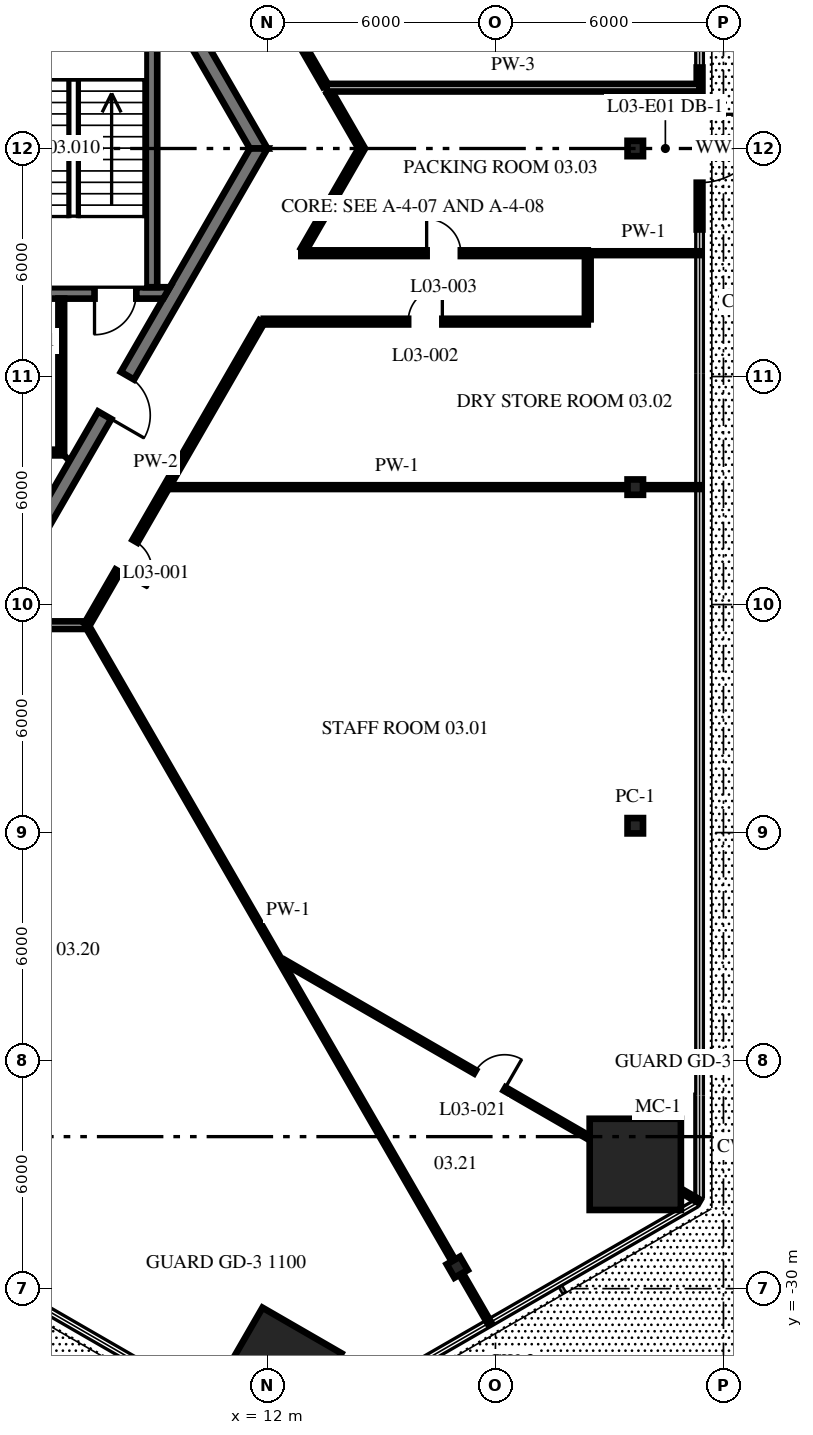
"""IFC4 building model, lengths in metres.
Left out: names, types, materials, properties, quantities, classifications, styles, units other than length and angle.
Written with IfcOpenShell. Run it as: python <this file> out.ifc"""

import sys

from ifc_helpers import new_model, si_unit, direction, frame, frame_2d, origin, origin_2d, place, context, subcontext, project, spatial, polyline, rectangle, i_section, outline, extrude, source, transform, mapped, element, fill, save


model = new_model("IFC4")
c1 = context("Model", 3, precision=1e-05, world=origin(), true_north=direction((0.0, 1.0)))
c2 = subcontext(c1, "Body", "Model", "MODEL_VIEW")
j1 = project(units=[si_unit("LENGTHUNIT", "METRE"), si_unit("PLANEANGLEUNIT", "RADIAN")], contexts=[c1])
p1 = place(None, origin())
s1 = spatial("IfcSite", under=j1, at=p1, CompositionType="ELEMENT")
p2 = place(p1, origin())
s2 = spatial("IfcBuilding", under=s1, at=p2, CompositionType="ELEMENT")
p3 = place(p2, frame((0.0, 0.0, 16.0)))
s3 = spatial("IfcBuildingStorey", under=s2, at=p3, CompositionType="ELEMENT", Elevation=16.0)
m1 = source(origin(), c2, "Body", "SweptSolid", [
    extrude(rectangle(XDim=2.4, YDim=2.4, at=origin_2d()), origin(), (0.0, 0.0, 1.0), 4.3),
])
p4 = place(p3, frame((21.679, -26.73, 0.0), z_axis=(0.0, 0.0, 1.0), x_axis=(0.0, 1.0, 0.0)))
e1 = element("IfcColumn", 1, at=p4, inside=s3, PredefinedType="COLUMN", context=c2, shape_type="MappedRepresentation", body=[
    mapped(m1, transform((0.0, 0.0, 0.0), scale=1.0)),
])
m2 = source(origin(), c2, "Body", "SweptSolid", [
    extrude(i_section(OverallWidth=0.404, OverallDepth=0.406, WebThickness=0.027, FlangeThickness=0.044, at=origin_2d()), origin(), (0.0, 0.0, 1.0), 4.3),
])
for number, where, z_axis, x_axis in (
    (2, (21.679, -17.82, 0.0), (0.0, 0.0, 1.0), (0.0, 1.0, 0.0)),
    (3, (21.679, -8.91, 0.0), (0.0, 0.0, 1.0), (0.0, 1.0, 0.0)),
    (4, (21.679, 0.0, 0.0), (0.0, 0.0, 1.0), (0.0, 1.0, 0.0)),
):
    element("IfcColumn", number, at=place(p3, frame(where, z_axis=z_axis, x_axis=x_axis)), inside=s3, PredefinedType="COLUMN", context=c2, shape_type="MappedRepresentation", body=[
        mapped(m2, transform((0.0, 0.0, 0.0), scale=1.0)),
    ])
p5 = place(p3, frame((12.309, -32.14, 0.0), z_axis=(0.0, 0.0, 1.0), x_axis=(0.866025403784, -0.5, 0.0)))
e5 = element("IfcColumn", 5, at=p5, inside=s3, PredefinedType="COLUMN", context=c2, shape_type="MappedRepresentation", body=[
    mapped(m1, transform((0.0, 0.0, 0.0), scale=1.0)),
])
p6 = place(p3, frame((16.994, -29.435, 0.0), z_axis=(0.0, 0.0, 1.0), x_axis=(0.866026276448, 0.4999984885, 0.0)))
e6 = element("IfcColumn", 6, at=p6, inside=s3, PredefinedType="COLUMN", context=c2, shape_type="MappedRepresentation", body=[
    mapped(m2, transform((0.0, 0.0, 0.0), scale=1.0)),
])
m3 = source(origin(), c2, "Body", "SweptSolid", [
    extrude(outline(polyline([(-0.115, -0.2), (11.885, -0.2), (11.654, 0.2), (0.115, 0.2), (-0.115, -0.2)])), origin(), (0.0, 0.0, 1.0), 4.1),
])
p7 = place(p3, frame((11.769, 0.0, 0.0), z_axis=(0.0, 0.0, 1.0), x_axis=(-0.499996592174, 0.866027371285, 0.0)))
e7 = element("IfcWall", 7, at=p7, inside=s3, PredefinedType="SHEAR", context=c2, shape_type="MappedRepresentation", body=[
    mapped(m3, transform((0.0, 0.0, 0.0), scale=1.0)),
])
p8 = place(p7, frame((5.75, 0.0, 0.0)))
e8 = element("IfcOpeningElement", 8, at=p8, cuts=e7, PredefinedType="OPENING", context=c2, shape_type="SweptSolid", body=[
    extrude(rectangle(XDim=1.2, YDim=2.1, at=frame_2d((0.6, 1.05))), frame((0.0, 0.21, 0.0), z_axis=(0.0, -1.0, 0.0), x_axis=(1.0, 0.0, 0.0)), (0.0, 0.0, 1.0), 0.42),
])
p9 = place(p3, frame((5.885, -10.192, 0.0), z_axis=(0.0, 0.0, 1.0), x_axis=(0.499996592174, 0.866027371285, 0.0)))
e9 = element("IfcWall", 9, at=p9, inside=s3, PredefinedType="SHEAR", context=c2, shape_type="MappedRepresentation", body=[
    mapped(m3, transform((0.0, 0.0, 0.0), scale=1.0)),
])
p10 = place(p9, frame((3.665, 0.0, 0.0)))
e10 = element("IfcOpeningElement", 10, at=p10, cuts=e9, PredefinedType="OPENING", context=c2, shape_type="SweptSolid", body=[
    extrude(rectangle(XDim=1.2, YDim=2.1, at=frame_2d((0.6, 1.05))), frame((0.0, 0.21, 0.0), z_axis=(0.0, -1.0, 0.0), x_axis=(1.0, 0.0, 0.0)), (0.0, 0.0, 1.0), 0.42),
])
m4 = source(origin(), c2, "Body", "SweptSolid", [
    extrude(outline(polyline([(0.0, -0.15), (0.0, 0.15), (4.433, 0.15), (4.26, -0.15), (0.0, -0.15)])), origin(), (0.0, 0.0, 1.0), 4.1),
])
p11 = place(p3, frame((5.0, -3.8, 0.0), z_axis=(0.0, 0.0, 1.0), x_axis=(1.0, 0.0, 0.0)))
e11 = element("IfcWall", 11, at=p11, inside=s3, PredefinedType="SHEAR", context=c2, shape_type="MappedRepresentation", body=[
    mapped(m4, transform((0.0, 0.0, 0.0), scale=1.0)),
])
p12 = place(p11, frame((2.45, 0.0, 0.0)))
e12 = element("IfcOpeningElement", 12, at=p12, cuts=e11, PredefinedType="OPENING", context=c2, shape_type="SweptSolid", body=[
    extrude(rectangle(XDim=1.1, YDim=2.1, at=frame_2d((0.55, 1.05))), frame((0.0, 0.16, 0.0), z_axis=(0.0, -1.0, 0.0), x_axis=(1.0, 0.0, 0.0)), (0.0, 0.0, 1.0), 0.32),
])
m5 = source(origin(), c2, "Body", "SweptSolid", [
    extrude(rectangle(XDim=7.3, YDim=0.3, at=frame_2d((3.65, 0.0))), origin(), (0.0, 0.0, 1.0), 4.1),
])
p13 = place(p3, frame((8.95, -3.65, 0.0), z_axis=(0.0, 0.0, 1.0), x_axis=(0.0, 1.0, 0.0)))
e13 = element("IfcWall", 13, at=p13, inside=s3, PredefinedType="SHEAR", context=c2, shape_type="MappedRepresentation", body=[
    mapped(m5, transform((0.0, 0.0, 0.0), scale=1.0)),
])
m6 = source(origin(), c2, "Body", "SweptSolid", [
    extrude(outline(polyline([(0.0, -0.075), (1.65, -0.075), (1.5, 0.075), (0.0, 0.075), (0.0, -0.075)])), origin(), (0.0, 0.0, 1.0), 4.1),
])
p14 = place(p3, frame((5.0, -8.0, 0.0), z_axis=(0.0, 0.0, 1.0), x_axis=(1.0, 0.0, 0.0)))
e14 = element("IfcWall", 14, at=p14, inside=s3, PredefinedType="PARTITIONING", context=c2, shape_type="MappedRepresentation", body=[
    mapped(m6, transform((0.0, 0.0, 0.0), scale=1.0)),
])
p15 = place(p14, frame((0.337, 0.0, 0.0)))
e15 = element("IfcOpeningElement", 15, at=p15, cuts=e14, PredefinedType="OPENING", context=c2, shape_type="SweptSolid", body=[
    extrude(rectangle(XDim=0.9, YDim=2.1, at=frame_2d((0.45, 1.05))), frame((0.0, 0.085, 0.0), z_axis=(0.0, -1.0, 0.0), x_axis=(1.0, 0.0, 0.0)), (0.0, 0.0, 1.0), 0.17),
])
p16 = place(p3, frame((6.575, -8.0, 0.0), z_axis=(0.0, 0.0, 1.0), x_axis=(0.0, 1.0, 0.0)))
e16 = element("IfcWall", 16, at=p16, inside=s3, PredefinedType="PARTITIONING", context=c2, shape_type="SweptSolid", body=[
    extrude(outline(polyline([(-0.075, -0.075), (4.05, -0.075), (4.05, 0.075), (0.075, 0.075), (-0.075, -0.075)])), origin(), (0.0, 0.0, 1.0), 4.1),
])
m7 = source(origin(), c2, "Body", "SweptSolid", [
    extrude(rectangle(XDim=4.263, YDim=0.15, at=frame_2d((2.131, 0.0))), origin(), (0.0, 0.0, 1.0), 4.1),
])
p17 = place(p3, frame((23.371, 2.131, 0.0), z_axis=(0.0, 0.0, 1.0), x_axis=(0.0, -1.0, 0.0)))
e17 = element("IfcWall", 17, at=p17, inside=s3, PredefinedType="ELEMENTEDWALL", context=c2, shape_type="MappedRepresentation", body=[
    mapped(m7, transform((0.0, 0.0, 0.0), scale=1.0)),
])
p18 = place(p17, frame((1.231, 0.0, 0.0)))
e18 = element("IfcOpeningElement", 18, at=p18, cuts=e17, PredefinedType="OPENING", context=c2, shape_type="SweptSolid", body=[
    extrude(rectangle(XDim=1.8, YDim=2.4, at=frame_2d((0.9, 1.2))), frame((0.0, 0.085, 0.0), z_axis=(0.0, -1.0, 0.0), x_axis=(1.0, 0.0, 0.0)), (0.0, 0.0, 1.0), 0.17),
])
p19 = place(p3, frame((7.241, -12.542, 0.0), z_axis=(0.0, 0.0, 1.0), x_axis=(0.500004409704, -0.866022857826, 0.0)))
e19 = element("IfcWall", 19, at=p19, inside=s3, PredefinedType="PARTITIONING", context=c2, shape_type="SweptSolid", body=[
    extrude(rectangle(XDim=19.313, YDim=0.1, at=frame_2d((9.656, 0.0))), origin(), (0.0, 0.0, 1.0), 4.1),
])
m8 = source(origin(), c2, "Body", "SweptSolid", [
    extrude(rectangle(XDim=1.499, YDim=0.1, at=frame_2d((0.749, 0.0))), origin(), (0.0, 0.0, 1.0), 4.1),
])
p20 = place(p3, frame((17.091, -29.602, 0.0), z_axis=(0.0, 0.0, 1.0), x_axis=(0.499976292358, -0.866039090965, 0.0)))
e20 = element("IfcWall", 20, at=p20, inside=s3, PredefinedType="PARTITIONING", context=c2, shape_type="MappedRepresentation", body=[
    mapped(m8, transform((0.0, 0.0, 0.0), scale=1.0)),
])
p21 = place(p3, frame((10.83, 6.327, 0.0), z_axis=(0.0, 0.0, 1.0), x_axis=(0.500005980693, -0.866021950802, 0.0)))
e21 = element("IfcWall", 21, at=p21, inside=s3, PredefinedType="PARTITIONING", context=c2, shape_type="SweptSolid", body=[
    extrude(rectangle(XDim=5.392, YDim=0.15, at=frame_2d((2.696, 0.0))), origin(), (0.0, 0.0, 1.0), 4.1),
])
p22 = place(p3, frame((13.625, 1.484, 0.0), z_axis=(0.0, 0.0, 1.0), x_axis=(0.500075917473, -0.865981568374, 0.0)))
e22 = element("IfcWall", 22, at=p22, inside=s3, PredefinedType="PARTITIONING", context=c2, shape_type="SweptSolid", body=[
    extrude(rectangle(XDim=1.674, YDim=0.15, at=frame_2d((0.837, 0.0))), origin(), (0.0, 0.0, 1.0), 4.1),
])
p23 = place(p3, frame((12.43, -21.39, 0.0), z_axis=(0.0, 0.0, 1.0), x_axis=(0.866017819526, -0.500013136091, 0.0)))
e23 = element("IfcWall", 23, at=p23, inside=s3, PredefinedType="PARTITIONING", context=c2, shape_type="SweptSolid", body=[
    extrude(rectangle(XDim=9.306, YDim=0.1, at=frame_2d((4.653, 0.0))), origin(), (0.0, 0.0, 1.0), 4.1),
])
p24 = place(p23, frame((5.81, 0.0, 0.0)))
e24 = element("IfcOpeningElement", 24, at=p24, cuts=e23, PredefinedType="OPENING", context=c2, shape_type="SweptSolid", body=[
    extrude(rectangle(XDim=0.9, YDim=2.1, at=frame_2d((0.45, 1.05))), frame((0.0, 0.06, 0.0), z_axis=(0.0, -1.0, 0.0), x_axis=(1.0, 0.0, 0.0)), (0.0, 0.0, 1.0), 0.12),
])
p25 = place(p3, frame((22.869, -27.417, 0.0), z_axis=(0.0, 0.0, 1.0), x_axis=(0.866031268329, -0.499989842173, 0.0)))
e25 = element("IfcWall", 25, at=p25, inside=s3, PredefinedType="PARTITIONING", context=c2, shape_type="SweptSolid", body=[
    extrude(rectangle(XDim=0.58, YDim=0.1, at=frame_2d((0.29, 0.0))), origin(), (0.0, 0.0, 1.0), 4.1),
])
p26 = place(p3, frame((3.114, -12.542, 0.0), z_axis=(0.0, 0.0, 1.0), x_axis=(1.0, 0.0, 0.0)))
e26 = element("IfcWall", 26, at=p26, inside=s3, PredefinedType="PARTITIONING", context=c2, shape_type="SweptSolid", body=[
    extrude(rectangle(XDim=4.088, YDim=0.2, at=frame_2d((2.044, 0.0))), origin(), (0.0, 0.0, 1.0), 4.1),
])
p27 = place(p26, frame((1.483, 0.0, 0.0)))
e27 = element("IfcOpeningElement", 27, at=p27, cuts=e26, PredefinedType="OPENING", context=c2, shape_type="SweptSolid", body=[
    extrude(rectangle(XDim=1.0, YDim=2.1, at=frame_2d((0.5, 1.05))), frame((0.0, 0.11, 0.0), z_axis=(0.0, -1.0, 0.0), x_axis=(1.0, 0.0, 0.0)), (0.0, 0.0, 1.0), 0.22),
])
m9 = source(origin(), c2, "Body", "SweptSolid", [
    extrude(rectangle(XDim=12.148, YDim=0.1, at=frame_2d((6.074, 0.0))), origin(), (0.0, 0.0, 1.0), 3.343),
])
p28 = place(p3, frame((9.338, -8.91, 0.0), z_axis=(0.0, 0.0, 1.0), x_axis=(1.0, 0.0, 0.0)))
e28 = element("IfcWall", 28, at=p28, inside=s3, PredefinedType="PARTITIONING", context=c2, shape_type="MappedRepresentation", body=[
    mapped(m9, transform((0.0, 0.0, 0.0), scale=1.0)),
])
p29 = place(p3, frame((21.873, -8.91, 0.0), z_axis=(0.0, 0.0, 1.0), x_axis=(1.0, 0.0, 0.0)))
e29 = element("IfcWall", 29, at=p29, inside=s3, PredefinedType="PARTITIONING", context=c2, shape_type="MappedRepresentation", body=[
    mapped(m8, transform((0.0, 0.0, 0.0), scale=1.0)),
])
p30 = place(p3, frame((11.903, -4.555, 0.0), z_axis=(0.0, 0.0, 1.0), x_axis=(1.0, 0.0, 0.0)))
e30 = element("IfcWall", 30, at=p30, inside=s3, PredefinedType="PARTITIONING", context=c2, shape_type="SweptSolid", body=[
    extrude(rectangle(XDim=8.527, YDim=0.15, at=frame_2d((4.263, 0.0))), origin(), (0.0, 0.0, 1.0), 3.417),
])
p31 = place(p30, frame((3.8, 0.0, 0.0)))
e31 = element("IfcOpeningElement", 31, at=p31, cuts=e30, PredefinedType="OPENING", context=c2, shape_type="SweptSolid", body=[
    extrude(rectangle(XDim=0.9, YDim=2.1, at=frame_2d((0.45, 1.05))), frame((0.0, 0.085, 0.0), z_axis=(0.0, -1.0, 0.0), x_axis=(1.0, 0.0, 0.0)), (0.0, 0.0, 1.0), 0.17),
])
p32 = place(p3, frame((12.892, -2.755, 0.0), z_axis=(0.0, 0.0, 1.0), x_axis=(1.0, 0.0, 0.0)))
e32 = element("IfcWall", 32, at=p32, inside=s3, PredefinedType="PARTITIONING", context=c2, shape_type="SweptSolid", body=[
    extrude(rectangle(XDim=7.537, YDim=0.15, at=frame_2d((3.769, 0.0))), origin(), (0.0, 0.0, 1.0), 4.1),
])
p33 = place(p32, frame((3.298, 0.0, 0.0)))
e33 = element("IfcOpeningElement", 33, at=p33, cuts=e32, PredefinedType="OPENING", context=c2, shape_type="SweptSolid", body=[
    extrude(rectangle(XDim=0.9, YDim=2.1, at=frame_2d((0.45, 1.05))), frame((0.0, 0.085, 0.0), z_axis=(0.0, -1.0, 0.0), x_axis=(1.0, 0.0, 0.0)), (0.0, 0.0, 1.0), 0.17),
])
m10 = source(origin(), c2, "Body", "SweptSolid", [
    extrude(rectangle(XDim=2.942, YDim=0.1, at=frame_2d((1.471, 0.0))), origin(), (0.0, 0.0, 1.0), 4.1),
])
p34 = place(p3, frame((20.429, -2.755, 0.0), z_axis=(0.0, 0.0, 1.0), x_axis=(1.0, 0.0, 0.0)))
e34 = element("IfcWall", 34, at=p34, inside=s3, PredefinedType="PARTITIONING", context=c2, shape_type="MappedRepresentation", body=[
    mapped(m10, transform((0.0, 0.0, 0.0), scale=1.0)),
])
p35 = place(p3, frame((13.559, 1.6, 0.0), z_axis=(0.0, 0.0, 1.0), x_axis=(1.0, 0.0, 0.0)))
e35 = element("IfcWall", 35, at=p35, inside=s3, PredefinedType="PARTITIONING", context=c2, shape_type="SweptSolid", body=[
    extrude(rectangle(XDim=9.812, YDim=0.2, at=frame_2d((4.906, 0.0))), origin(), (0.0, 0.0, 1.0), 4.1),
])
p36 = place(p3, frame((7.251, -12.525, 0.0), z_axis=(0.0, 0.0, 1.0), x_axis=(0.499988071196, 0.866032290773, 0.0)))
e36 = element("IfcWall", 36, at=p36, inside=s3, PredefinedType="PARTITIONING", context=c2, shape_type="SweptSolid", body=[
    extrude(rectangle(XDim=9.203, YDim=0.15, at=frame_2d((4.602, 0.0))), origin(), (0.0, 0.0, 1.0), 4.1),
])
p37 = place(p36, frame((1.63, 0.0, 0.0)))
e37 = element("IfcOpeningElement", 37, at=p37, cuts=e36, PredefinedType="OPENING", context=c2, shape_type="SweptSolid", body=[
    extrude(rectangle(XDim=0.9, YDim=2.1, at=frame_2d((0.45, 1.05))), frame((0.0, 0.085, 0.0), z_axis=(0.0, -1.0, 0.0), x_axis=(1.0, 0.0, 0.0)), (0.0, 0.0, 1.0), 0.17),
])
p38 = place(p3, frame((12.947, -2.66, 0.0), z_axis=(0.0, 0.0, 1.0), x_axis=(0.499986217557, 0.866033360935, 0.0)))
e38 = element("IfcWall", 38, at=p38, inside=s3, PredefinedType="PARTITIONING", context=c2, shape_type="SweptSolid", body=[
    extrude(rectangle(XDim=3.071, YDim=0.15, at=frame_2d((1.536, 0.0))), origin(), (0.0, 0.0, 1.0), 4.1),
])
p39 = place(p3, frame((20.429, -4.495, 0.0), z_axis=(0.0, 0.0, 1.0), x_axis=(0.0, 1.0, 0.0)))
e39 = element("IfcWall", 39, at=p39, inside=s3, PredefinedType="PARTITIONING", context=c2, shape_type="SweptSolid", body=[
    extrude(rectangle(XDim=1.68, YDim=0.15, at=frame_2d((0.84, 0.0))), origin(), (0.0, 0.0, 1.0), 4.1),
])
p40 = place(p10, frame((1.2, 0.0, 0.0), z_axis=(0.0, 0.0, 1.0), x_axis=(-1.0, 0.0, 0.0)))
e40 = element("IfcDoor", 40, at=p40, inside=s3, OperationType="SINGLE_SWING_RIGHT", PredefinedType="DOOR", context=c2, shape_type="SweptSolid", body=[
    extrude(rectangle(XDim=1.2, YDim=2.1, at=frame_2d((0.6, 1.05))), frame((0.0, 0.025, 0.0), z_axis=(0.0, -1.0, 0.0), x_axis=(1.0, 0.0, 0.0)), (0.0, 0.0, 1.0), 0.05),
])
fill(e10, e40)
p41 = place(p12, frame((1.1, 0.0, 0.0), z_axis=(0.0, 0.0, 1.0), x_axis=(-1.0, 0.0, 0.0)))
e41 = element("IfcDoor", 41, at=p41, inside=s3, OperationType="SINGLE_SWING_RIGHT", PredefinedType="DOOR", context=c2, shape_type="SweptSolid", body=[
    extrude(rectangle(XDim=1.1, YDim=2.1, at=frame_2d((0.55, 1.05))), frame((0.0, 0.025, 0.0), z_axis=(0.0, -1.0, 0.0), x_axis=(1.0, 0.0, 0.0)), (0.0, 0.0, 1.0), 0.05),
])
fill(e12, e41)
p42 = place(p18, origin())
e42 = element("IfcDoor", 42, at=p42, inside=s3, OperationType="DOUBLE_DOOR_SINGLE_SWING", PredefinedType="DOOR", context=c2, shape_type="SweptSolid", body=[
    extrude(rectangle(XDim=1.8, YDim=2.4, at=frame_2d((0.9, 1.2))), frame((0.0, 0.025, 0.0), z_axis=(0.0, -1.0, 0.0), x_axis=(1.0, 0.0, 0.0)), (0.0, 0.0, 1.0), 0.05),
])
fill(e18, e42)
p43 = place(p37, origin())
e43 = element("IfcDoor", 43, at=p43, inside=s3, OperationType="SINGLE_SWING_RIGHT", PredefinedType="DOOR", context=c2, shape_type="SweptSolid", body=[
    extrude(rectangle(XDim=0.9, YDim=2.1, at=frame_2d((0.45, 1.05))), frame((0.0, 0.025, 0.0), z_axis=(0.0, -1.0, 0.0), x_axis=(1.0, 0.0, 0.0)), (0.0, 0.0, 1.0), 0.05),
])
fill(e37, e43)
p44 = place(p31, origin())
e44 = element("IfcDoor", 44, at=p44, inside=s3, OperationType="SINGLE_SWING_LEFT", PredefinedType="DOOR", context=c2, shape_type="SweptSolid", body=[
    extrude(rectangle(XDim=0.9, YDim=2.1, at=frame_2d((0.45, 1.05))), frame((0.0, 0.025, 0.0), z_axis=(0.0, -1.0, 0.0), x_axis=(1.0, 0.0, 0.0)), (0.0, 0.0, 1.0), 0.05),
])
fill(e31, e44)
p45 = place(p33, origin())
e45 = element("IfcDoor", 45, at=p45, inside=s3, OperationType="SINGLE_SWING_LEFT", PredefinedType="DOOR", context=c2, shape_type="SweptSolid", body=[
    extrude(rectangle(XDim=0.9, YDim=2.1, at=frame_2d((0.45, 1.05))), frame((0.0, 0.025, 0.0), z_axis=(0.0, -1.0, 0.0), x_axis=(1.0, 0.0, 0.0)), (0.0, 0.0, 1.0), 0.05),
])
fill(e33, e45)
p46 = place(p24, origin())
e46 = element("IfcDoor", 46, at=p46, inside=s3, OperationType="SINGLE_SWING_LEFT", PredefinedType="DOOR", context=c2, shape_type="SweptSolid", body=[
    extrude(rectangle(XDim=0.9, YDim=2.1, at=frame_2d((0.45, 1.05))), frame((0.0, 0.025, 0.0), z_axis=(0.0, -1.0, 0.0), x_axis=(1.0, 0.0, 0.0)), (0.0, 0.0, 1.0), 0.05),
])
fill(e24, e46)
save(model, sys.argv[1])
